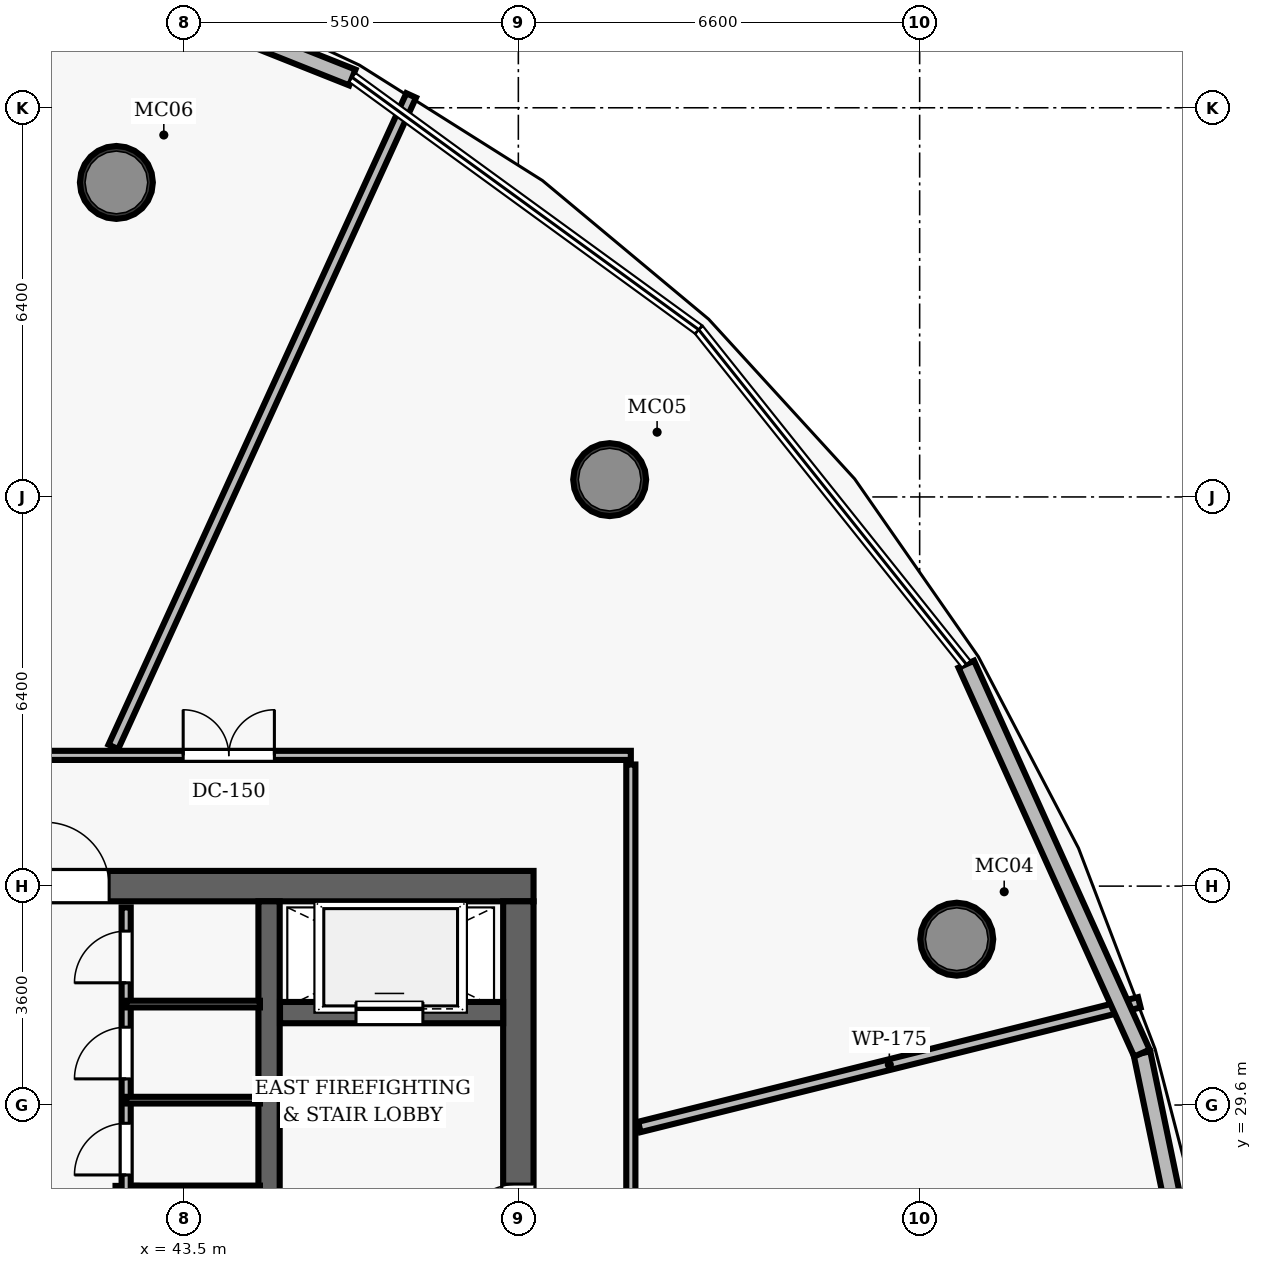
"""IFC4 building model, lengths in metres.
Left out: names, types, materials, properties, quantities, classifications, styles, units other than length and angle.
Written with IfcOpenShell. Run it as: python <this file> out.ifc"""

import sys

from ifc_helpers import new_model, si_unit, direction, frame, frame_2d, origin, origin_2d, place, context, subcontext, project, spatial, rectangle, hollow_circle, extrude, element, fill, save


model = new_model("IFC4")
c1 = context("Model", 3, precision=1e-05, world=origin(), true_north=direction((0.0, 1.0)))
c2 = subcontext(c1, "Body", "Model", "MODEL_VIEW")
j1 = project(units=[si_unit("LENGTHUNIT", "METRE"), si_unit("PLANEANGLEUNIT", "RADIAN")], contexts=[c1])
p1 = place(None, origin())
s1 = spatial("IfcSite", under=j1, at=p1, CompositionType="ELEMENT")
p2 = place(p1, origin())
s2 = spatial("IfcBuilding", under=s1, at=p2, CompositionType="ELEMENT")
p3 = place(p2, frame((0.0, 0.0, 205.85)))
s3 = spatial("IfcBuildingStorey", under=s2, at=p3, CompositionType="ELEMENT", Elevation=205.85)
p4 = place(p3, frame((26.75, 33.2, 0.0), z_axis=(0.0, 0.0, 1.0), x_axis=(1.0, 0.0, 0.0)))
e1 = element("IfcWall", 1, at=p4, inside=s3, PredefinedType="SHEAR", context=c2, shape_type="SweptSolid", body=[
    extrude(rectangle(XDim=22.5, YDim=0.5, at=frame_2d((11.25, 0.0))), origin(), (0.0, 0.0, 1.0), 3.85),
])
p5 = place(p4, frame((4.57, 0.0, 0.0)))
e2 = element("IfcOpeningElement", 2, at=p5, cuts=e1, PredefinedType="OPENING", context=c2, shape_type="SweptSolid", body=[
    extrude(rectangle(XDim=1.05, YDim=2.15, at=frame_2d((0.525, 1.075))), frame((0.0, 0.26, 0.0), z_axis=(0.0, -1.0, 0.0), x_axis=(1.0, 0.0, 0.0)), (0.0, 0.0, 1.0), 0.52),
])
p6 = place(p4, frame((14.47, 0.0, 0.0)))
e3 = element("IfcOpeningElement", 3, at=p6, cuts=e1, PredefinedType="OPENING", context=c2, shape_type="SweptSolid", body=[
    extrude(rectangle(XDim=1.05, YDim=2.15, at=frame_2d((0.525, 1.075))), frame((0.0, 0.26, 0.0), z_axis=(0.0, -1.0, 0.0), x_axis=(1.0, 0.0, 0.0)), (0.0, 0.0, 1.0), 0.52),
])
p7 = place(p3, frame((49.0, 19.05, 0.0), z_axis=(0.0, 0.0, 1.0), x_axis=(0.0, 1.0, 0.0)))
e4 = element("IfcWall", 4, at=p7, inside=s3, PredefinedType="SHEAR", context=c2, shape_type="SweptSolid", body=[
    extrude(rectangle(XDim=13.9, YDim=0.5, at=frame_2d((6.95, 0.0))), origin(), (0.0, 0.0, 1.0), 3.85),
])
p8 = place(p7, frame((8.2, 0.0, 0.0)))
e5 = element("IfcOpeningElement", 5, at=p8, cuts=e4, PredefinedType="OPENING", context=c2, shape_type="SweptSolid", body=[
    extrude(rectangle(XDim=1.05, YDim=2.15, at=frame_2d((0.525, 1.075))), frame((0.0, 0.26, 0.0), z_axis=(0.0, -1.0, 0.0), x_axis=(1.0, 0.0, 0.0)), (0.0, 0.0, 1.0), 0.52),
])
p9 = place(p3, frame((44.9, 19.05, 0.0), z_axis=(0.0, 0.0, 1.0), x_axis=(0.0, 1.0, 0.0)))
e6 = element("IfcWall", 6, at=p9, inside=s3, PredefinedType="SHEAR", context=c2, shape_type="SweptSolid", body=[
    extrude(rectangle(XDim=13.9, YDim=0.35, at=frame_2d((6.95, 0.0))), origin(), (0.0, 0.0, 1.0), 3.85),
])
for number, where, z_axis, x_axis in (
    (7, (56.21, 32.327, 0.0), (0.0, 0.0, 1.0), (1.0, 0.0, 0.0)),
    (8, (50.502, 39.885, 0.0), (0.0, 0.0, 1.0), (1.0, 0.0, 0.0)),
    (9, (42.389, 44.772, 0.0), (0.0, 0.0, 1.0), (1.0, 0.0, 0.0)),
):
    element("IfcColumn", number, at=place(p3, frame(where, z_axis=z_axis, x_axis=x_axis)), inside=s3, PredefinedType="COLUMN", context=c2, shape_type="SweptSolid", body=[
        extrude(hollow_circle(Radius=0.6, WallThickness=0.05, at=origin_2d()), origin(), (0.0, 0.0, 1.0), 3.85),
    ])
p10 = place(p3, frame((45.08, 31.12, 0.0), z_axis=(0.0, 0.0, 1.0), x_axis=(1.0, 0.0, 0.0)))
e10 = element("IfcWall", 10, at=p10, inside=s3, PredefinedType="SHEAR", context=c2, shape_type="SweptSolid", body=[
    extrude(rectangle(XDim=3.67, YDim=0.35, at=frame_2d((1.835, 0.0))), origin(), (0.0, 0.0, 1.0), 3.035),
])
p11 = place(p10, frame((1.25, 0.0, 0.0)))
e11 = element("IfcOpeningElement", 11, at=p11, cuts=e10, PredefinedType="OPENING", context=c2, shape_type="SweptSolid", body=[
    extrude(rectangle(XDim=1.1, YDim=2.15, at=frame_2d((0.55, 1.075))), frame((0.0, 0.185, 0.0), z_axis=(0.0, -1.0, 0.0), x_axis=(1.0, 0.0, 0.0)), (0.0, 0.0, 1.0), 0.37),
])
p12 = place(p3, frame((42.55, 21.73, 0.0), z_axis=(0.0, 0.0, 1.0), x_axis=(0.0, 1.0, 0.0)))
e12 = element("IfcWall", 12, at=p12, inside=s3, PredefinedType="SHEAR", context=c2, shape_type="SweptSolid", body=[
    extrude(rectangle(XDim=6.54, YDim=0.35, at=frame_2d((3.27, 0.0))), origin(), (0.0, 0.0, 1.0), 3.035),
])
p13 = place(p3, frame((42.72, 28.1, 0.0), z_axis=(0.0, 0.0, 1.0), x_axis=(1.0, 0.0, 0.0)))
e13 = element("IfcWall", 13, at=p13, inside=s3, PredefinedType="SHEAR", context=c2, shape_type="SweptSolid", body=[
    extrude(rectangle(XDim=2.03, YDim=0.35, at=frame_2d((1.015, 0.0))), origin(), (0.0, 0.0, 1.0), 3.035),
])
p14 = place(p3, frame((42.55, 28.1, 0.0), z_axis=(0.0, 0.0, 1.0), x_axis=(0.0, 1.0, 0.0)))
e14 = element("IfcWall", 14, at=p14, inside=s3, PredefinedType="PARTITIONING", context=c2, shape_type="SweptSolid", body=[
    extrude(rectangle(XDim=4.75, YDim=0.15, at=frame_2d((2.375, 0.0))), origin(), (0.0, 0.0, 1.0), 3.035),
])
p15 = place(p14, frame((0.35, 0.0, 0.0)))
e15 = element("IfcOpeningElement", 15, at=p15, cuts=e14, PredefinedType="OPENING", context=c2, shape_type="SweptSolid", body=[
    extrude(rectangle(XDim=0.85, YDim=2.1, at=frame_2d((0.425, 1.05))), frame((0.0, 0.085, 0.0), z_axis=(0.0, -1.0, 0.0), x_axis=(1.0, 0.0, 0.0)), (0.0, 0.0, 1.0), 0.17),
])
p16 = place(p14, frame((1.93, 0.0, 0.0)))
e16 = element("IfcOpeningElement", 16, at=p16, cuts=e14, PredefinedType="OPENING", context=c2, shape_type="SweptSolid", body=[
    extrude(rectangle(XDim=0.85, YDim=2.1, at=frame_2d((0.425, 1.05))), frame((0.0, 0.085, 0.0), z_axis=(0.0, -1.0, 0.0), x_axis=(1.0, 0.0, 0.0)), (0.0, 0.0, 1.0), 0.17),
])
p17 = place(p14, frame((3.51, 0.0, 0.0)))
e17 = element("IfcOpeningElement", 17, at=p17, cuts=e14, PredefinedType="OPENING", context=c2, shape_type="SweptSolid", body=[
    extrude(rectangle(XDim=0.85, YDim=2.1, at=frame_2d((0.425, 1.05))), frame((0.0, 0.085, 0.0), z_axis=(0.0, -1.0, 0.0), x_axis=(1.0, 0.0, 0.0)), (0.0, 0.0, 1.0), 0.17),
])
for number, where, z_axis, x_axis in (
    (18, (42.55, 29.68, 0.0), (0.0, 0.0, 1.0), (1.0, 0.0, 0.0)),
    (19, (42.55, 31.26, 0.0), (0.0, 0.0, 1.0), (1.0, 0.0, 0.0)),
):
    element("IfcWall", number, at=place(p3, frame(where, z_axis=z_axis, x_axis=x_axis)), inside=s3, PredefinedType="PARTITIONING", context=c2, shape_type="SweptSolid", body=[
        extrude(rectangle(XDim=2.2, YDim=0.11, at=frame_2d((1.1, 0.0))), origin(), (0.0, 0.0, 1.0), 3.035),
    ])
p18 = place(p3, frame((24.85, 35.35, 0.0), z_axis=(0.0, 0.0, 1.0), x_axis=(1.0, 0.0, 0.0)))
e20 = element("IfcWall", 20, at=p18, inside=s3, PredefinedType="PARTITIONING", context=c2, shape_type="SweptSolid", body=[
    extrude(rectangle(XDim=26.0, YDim=0.15, at=frame_2d((13.0, 0.0))), origin(), (0.0, 0.0, 1.0), 3.035),
])
p19 = place(p18, frame((18.638, 0.0, 0.0)))
e21 = element("IfcOpeningElement", 21, at=p19, cuts=e20, PredefinedType="OPENING", context=c2, shape_type="SweptSolid", body=[
    extrude(rectangle(XDim=1.5, YDim=2.2, at=frame_2d((0.75, 1.1))), frame((0.0, 0.085, 0.0), z_axis=(0.0, -1.0, 0.0), x_axis=(1.0, 0.0, 0.0)), (0.0, 0.0, 1.0), 0.17),
])
p20 = place(p18, frame((9.737, 0.0, 0.0)))
e22 = element("IfcOpeningElement", 22, at=p20, cuts=e20, PredefinedType="OPENING", context=c2, shape_type="SweptSolid", body=[
    extrude(rectangle(XDim=1.5, YDim=2.2, at=frame_2d((0.75, 1.1))), frame((0.0, 0.085, 0.0), z_axis=(0.0, -1.0, 0.0), x_axis=(1.0, 0.0, 0.0)), (0.0, 0.0, 1.0), 0.17),
])
p21 = place(p18, frame((5.148, 0.0, 0.0)))
e23 = element("IfcOpeningElement", 23, at=p21, cuts=e20, PredefinedType="OPENING", context=c2, shape_type="SweptSolid", body=[
    extrude(rectangle(XDim=0.95, YDim=2.15, at=frame_2d((0.475, 1.075))), frame((0.0, 0.085, 0.0), z_axis=(0.0, -1.0, 0.0), x_axis=(1.0, 0.0, 0.0)), (0.0, 0.0, 1.0), 0.17),
])
p22 = place(p3, frame((50.85, 27.08, 0.0), z_axis=(0.0, 0.0, 1.0), x_axis=(0.0, 1.0, 0.0)))
e24 = element("IfcWall", 24, at=p22, inside=s3, PredefinedType="PARTITIONING", context=c2, shape_type="SweptSolid", body=[
    extrude(rectangle(XDim=8.12, YDim=0.15, at=frame_2d((4.06, 0.0))), origin(), (0.0, 0.0, 1.0), 3.035),
])
p23 = place(p3, frame((50.99, 29.239, 0.0), z_axis=(0.0, 0.0, 1.0), x_axis=(0.970296522977, 0.241918700182, 0.0)))
e25 = element("IfcWall", 25, at=p23, inside=s3, PredefinedType="PARTITIONING", context=c2, shape_type="SweptSolid", body=[
    extrude(rectangle(XDim=8.474, YDim=0.175, at=frame_2d((4.237, 0.0))), origin(), (0.0, 0.0, 1.0), 3.035),
])
p24 = place(p3, frame((42.339, 35.49, 0.0), z_axis=(0.0, 0.0, 1.0), x_axis=(0.415828822924, 0.909442900916, 0.0)))
e26 = element("IfcWall", 26, at=p24, inside=s3, PredefinedType="PARTITIONING", context=c2, shape_type="SweptSolid", body=[
    extrude(rectangle(XDim=11.779, YDim=0.175, at=frame_2d((5.89, 0.0))), origin(), (0.0, 0.0, 1.0), 3.035),
])
p25 = place(p3, frame((59.256, 30.454, 0.0), z_axis=(0.0, 0.0, 1.0), x_axis=(0.203597872563, -0.979054598216, 0.0)))
e27 = element("IfcWall", 27, at=p25, inside=s3, PredefinedType="SOLIDWALL", context=c2, shape_type="SweptSolid", body=[
    extrude(rectangle(XDim=6.785, YDim=0.28, at=frame_2d((3.392, 0.0))), origin(), (0.0, 0.0, 1.0), 3.62),
])
p26 = place(p3, frame((56.367, 36.849, 0.0), z_axis=(0.0, 0.0, 1.0), x_axis=(0.411673410611, -0.911331445192, 0.0)))
e28 = element("IfcWall", 28, at=p26, inside=s3, PredefinedType="SOLIDWALL", context=c2, shape_type="SweptSolid", body=[
    extrude(rectangle(XDim=7.018, YDim=0.28, at=frame_2d((3.509, 0.0))), origin(), (0.0, 0.0, 1.0), 3.62),
])
p27 = place(p3, frame((39.75, 49.094, 0.0), z_axis=(0.0, 0.0, 1.0), x_axis=(0.929068117102, -0.369908683035, 0.0)))
e29 = element("IfcWall", 29, at=p27, inside=s3, PredefinedType="SOLIDWALL", context=c2, shape_type="SweptSolid", body=[
    extrude(rectangle(XDim=7.018, YDim=0.28, at=frame_2d((3.509, 0.0))), origin(), (0.0, 0.0, 1.0), 3.62),
])
p28 = place(p8, origin())
e30 = element("IfcDoor", 30, at=p28, inside=s3, OperationType="SINGLE_SWING_LEFT", PredefinedType="DOOR", context=c2, shape_type="SweptSolid", body=[
    extrude(rectangle(XDim=1.05, YDim=2.15, at=frame_2d((0.525, 1.075))), frame((0.0, 0.025, 0.0), z_axis=(0.0, -1.0, 0.0), x_axis=(1.0, 0.0, 0.0)), (0.0, 0.0, 1.0), 0.05),
])
fill(e5, e30)
p29 = place(p6, origin())
e31 = element("IfcDoor", 31, at=p29, inside=s3, OperationType="SINGLE_SWING_LEFT", PredefinedType="DOOR", context=c2, shape_type="SweptSolid", body=[
    extrude(rectangle(XDim=1.05, YDim=2.15, at=frame_2d((0.525, 1.075))), frame((0.0, 0.025, 0.0), z_axis=(0.0, -1.0, 0.0), x_axis=(1.0, 0.0, 0.0)), (0.0, 0.0, 1.0), 0.05),
])
fill(e3, e31)
p30 = place(p15, origin())
e32 = element("IfcDoor", 32, at=p30, inside=s3, OperationType="SINGLE_SWING_LEFT", PredefinedType="DOOR", context=c2, shape_type="SweptSolid", body=[
    extrude(rectangle(XDim=0.85, YDim=2.1, at=frame_2d((0.425, 1.05))), frame((0.0, 0.025, 0.0), z_axis=(0.0, -1.0, 0.0), x_axis=(1.0, 0.0, 0.0)), (0.0, 0.0, 1.0), 0.05),
])
fill(e15, e32)
p31 = place(p16, origin())
e33 = element("IfcDoor", 33, at=p31, inside=s3, OperationType="SINGLE_SWING_LEFT", PredefinedType="DOOR", context=c2, shape_type="SweptSolid", body=[
    extrude(rectangle(XDim=0.85, YDim=2.1, at=frame_2d((0.425, 1.05))), frame((0.0, 0.025, 0.0), z_axis=(0.0, -1.0, 0.0), x_axis=(1.0, 0.0, 0.0)), (0.0, 0.0, 1.0), 0.05),
])
fill(e16, e33)
p32 = place(p17, origin())
e34 = element("IfcDoor", 34, at=p32, inside=s3, OperationType="SINGLE_SWING_LEFT", PredefinedType="DOOR", context=c2, shape_type="SweptSolid", body=[
    extrude(rectangle(XDim=0.85, YDim=2.1, at=frame_2d((0.425, 1.05))), frame((0.0, 0.025, 0.0), z_axis=(0.0, -1.0, 0.0), x_axis=(1.0, 0.0, 0.0)), (0.0, 0.0, 1.0), 0.05),
])
fill(e17, e34)
p33 = place(p19, origin())
e35 = element("IfcDoor", 35, at=p33, inside=s3, OperationType="DOUBLE_DOOR_SINGLE_SWING", PredefinedType="DOOR", context=c2, shape_type="SweptSolid", body=[
    extrude(rectangle(XDim=1.5, YDim=2.2, at=frame_2d((0.75, 1.1))), frame((0.0, 0.025, 0.0), z_axis=(0.0, -1.0, 0.0), x_axis=(1.0, 0.0, 0.0)), (0.0, 0.0, 1.0), 0.05),
])
fill(e21, e35)
p34 = place(p11, origin())
e36 = element("IfcDoor", 36, at=p34, inside=s3, OperationType="SLIDING_TO_LEFT", PredefinedType="DOOR", context=c2, shape_type="SweptSolid", body=[
    extrude(rectangle(XDim=1.1, YDim=2.15, at=frame_2d((0.55, 1.075))), frame((0.0, 0.025, 0.0), z_axis=(0.0, -1.0, 0.0), x_axis=(1.0, 0.0, 0.0)), (0.0, 0.0, 1.0), 0.05),
])
fill(e11, e36)
save(model, sys.argv[1])
